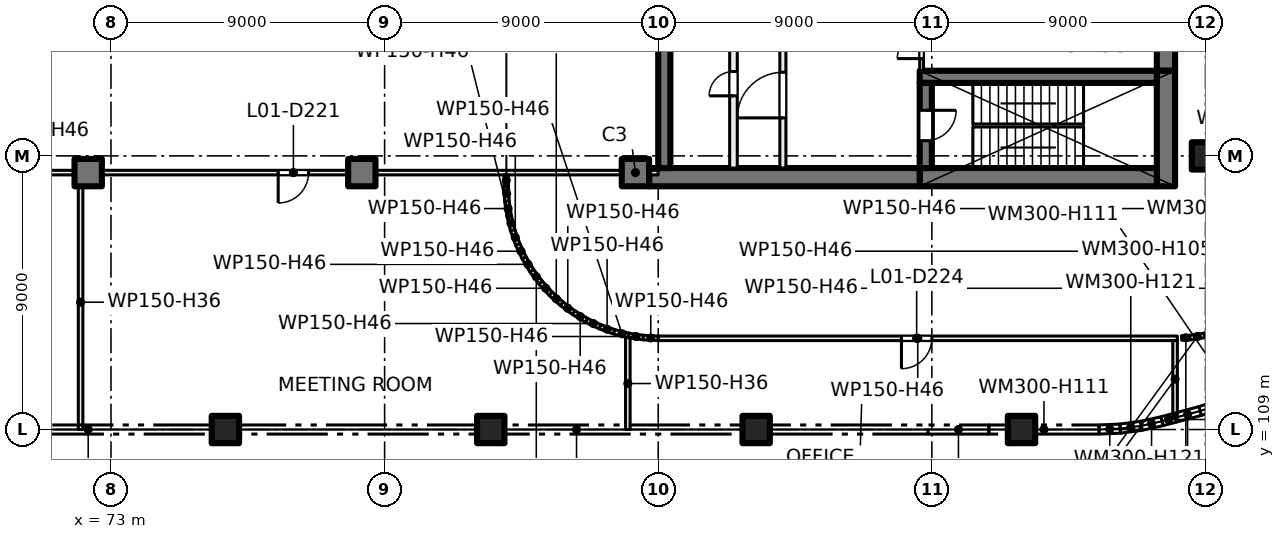
"""IFC4 building model, lengths in metres.
Left out: names, types, materials, properties, quantities, classifications, styles, units other than length and angle.
Written with IfcOpenShell. Run it as: python <this file> out.ifc"""

import sys

from ifc_helpers import new_model, si_unit, direction, frame, frame_2d, origin, origin_2d, place, context, subcontext, project, spatial, rectangle, extrude, element, fill, save


model = new_model("IFC4")
c1 = context("Model", 3, precision=1e-05, world=origin(), true_north=direction((0.0, 1.0)))
c2 = subcontext(c1, "Body", "Model", "MODEL_VIEW")
j1 = project(units=[si_unit("LENGTHUNIT", "METRE"), si_unit("PLANEANGLEUNIT", "RADIAN")], contexts=[c1])
p1 = place(None, origin())
s1 = spatial("IfcSite", under=j1, at=p1, CompositionType="ELEMENT")
p2 = place(p1, origin())
s2 = spatial("IfcBuilding", under=s1, at=p2, CompositionType="ELEMENT")
p3 = place(p2, frame((0.0, 0.0, 7.5)))
s3 = spatial("IfcBuildingStorey", under=s2, at=p3, CompositionType="ELEMENT", Elevation=7.5)
for number, where, z_axis, x_axis in (
    (1, (109.0, 118.0, 0.0), (0.0, 0.0, 1.0), (1.0, 0.0, 0.0)),
    (2, (76.762, 109.0, 0.0), (0.0, 0.0, 1.0), (1.0, 0.0, 0.0)),
    (3, (85.491, 109.0, 0.0), (0.0, 0.0, 1.0), (1.0, 0.0, 0.0)),
    (4, (94.221, 109.0, 0.0), (0.0, 0.0, 1.0), (1.0, 0.0, 0.0)),
    (5, (102.95, 109.0, 0.0), (0.0, 0.0, 1.0), (1.0, 0.0, 0.0)),
    (6, (72.25, 117.45, 0.0), (0.0, 0.0, 1.0), (1.0, 0.0, 0.0)),
    (7, (81.25, 117.45, 0.0), (0.0, 0.0, 1.0), (1.0, 0.0, 0.0)),
    (8, (90.25, 117.45, 0.0), (0.0, 0.0, 1.0), (1.0, 0.0, 0.0)),
):
    element("IfcColumn", number, at=place(p3, frame(where, z_axis=z_axis, x_axis=x_axis)), inside=s3, PredefinedType="COLUMN", context=c2, shape_type="SweptSolid", body=[
        extrude(rectangle(XDim=0.9, YDim=0.9, at=origin_2d()), origin(), (0.0, 0.0, 1.0), 5.0),
    ])
p4 = place(p3, frame((107.7, 135.2, 0.0), z_axis=(0.0, 0.0, 1.0), x_axis=(0.0, -1.0, 0.0)))
e9 = element("IfcWall", 9, at=p4, inside=s3, PredefinedType="SHEAR", context=c2, shape_type="SweptSolid", body=[
    extrude(rectangle(XDim=14.4, YDim=0.6, at=frame_2d((7.2, 0.0))), origin(), (0.0, 0.0, 1.0), 5.0),
])
p5 = place(p3, frame((107.7, 120.8, 0.0), z_axis=(0.0, 0.0, 1.0), x_axis=(0.0, -1.0, 0.0)))
e10 = element("IfcWall", 10, at=p5, inside=s3, PredefinedType="SHEAR", context=c2, shape_type="SweptSolid", body=[
    extrude(rectangle(XDim=3.8, YDim=0.6, at=frame_2d((1.9, 0.0))), origin(), (0.0, 0.0, 1.0), 5.0),
])
p6 = place(p3, frame((107.4, 117.3, 0.0), z_axis=(0.0, 0.0, 1.0), x_axis=(-1.0, 0.0, 0.0)))
e11 = element("IfcWall", 11, at=p6, inside=s3, PredefinedType="SHEAR", context=c2, shape_type="SweptSolid", body=[
    extrude(rectangle(XDim=7.8, YDim=0.6, at=frame_2d((3.9, 0.0))), origin(), (0.0, 0.0, 1.0), 5.0),
])
p7 = place(p3, frame((99.6, 117.3, 0.0), z_axis=(0.0, 0.0, 1.0), x_axis=(-1.0, 0.0, 0.0)))
e12 = element("IfcWall", 12, at=p7, inside=s3, PredefinedType="SHEAR", context=c2, shape_type="SweptSolid", body=[
    extrude(rectangle(XDim=8.9, YDim=0.6, at=frame_2d((4.45, 0.0))), origin(), (0.0, 0.0, 1.0), 5.0),
])
p8 = place(p3, frame((107.4, 120.6, 0.0), z_axis=(0.0, 0.0, 1.0), x_axis=(-1.0, 0.0, 0.0)))
e13 = element("IfcWall", 13, at=p8, inside=s3, PredefinedType="SHEAR", context=c2, shape_type="SweptSolid", body=[
    extrude(rectangle(XDim=7.8, YDim=0.4, at=frame_2d((3.9, 0.0))), origin(), (0.0, 0.0, 1.0), 5.0),
])
p9 = place(p3, frame((99.8, 120.4, 0.0), z_axis=(0.0, 0.0, 1.0), x_axis=(0.0, -1.0, 0.0)))
e14 = element("IfcWall", 14, at=p9, inside=s3, PredefinedType="SHEAR", context=c2, shape_type="SweptSolid", body=[
    extrude(rectangle(XDim=2.8, YDim=0.4, at=frame_2d((1.4, 0.0))), origin(), (0.0, 0.0, 1.0), 5.0),
])
p10 = place(p9, frame((0.9, 0.0, 0.0)))
e15 = element("IfcOpeningElement", 15, at=p10, cuts=e14, PredefinedType="OPENING", context=c2, shape_type="SweptSolid", body=[
    extrude(rectangle(XDim=1.0, YDim=2.1, at=frame_2d((0.5, 1.05))), frame((0.0, 0.21, 0.0), z_axis=(0.0, -1.0, 0.0), x_axis=(1.0, 0.0, 0.0)), (0.0, 0.0, 1.0), 0.42),
])
p11 = place(p3, frame((91.2, 126.2, 0.0), z_axis=(0.0, 0.0, 1.0), x_axis=(0.0, -1.0, 0.0)))
e16 = element("IfcWall", 16, at=p11, inside=s3, PredefinedType="SHEAR", context=c2, shape_type="SweptSolid", body=[
    extrude(rectangle(XDim=8.6, YDim=0.4, at=frame_2d((4.3, 0.0))), origin(), (0.0, 0.0, 1.0), 5.0),
])
p12 = place(p2, origin())
s4 = spatial("IfcBuildingStorey", under=s2, at=p12, CompositionType="ELEMENT", Elevation=0.0)
p13 = place(p12, frame((67.75, 109.0, 0.0), z_axis=(0.0, 0.0, 1.0), x_axis=(1.0, 0.0, 0.0)))
e17 = element("IfcWall", 17, at=p13, inside=s4, PredefinedType="PARTITIONING", context=c2, shape_type="SweptSolid", body=[
    extrude(rectangle(XDim=9.0, YDim=0.3, at=frame_2d((4.5, 0.0))), origin(), (0.0, 0.0, 1.0), 11.1),
])
p14 = place(p12, frame((76.75, 109.0, 0.0), z_axis=(0.0, 0.0, 1.0), x_axis=(1.0, 0.0, 0.0)))
e18 = element("IfcWall", 18, at=p14, inside=s4, PredefinedType="PARTITIONING", context=c2, shape_type="SweptSolid", body=[
    extrude(rectangle(XDim=23.125, YDim=0.3, at=frame_2d((11.562, 0.0))), origin(), (0.0, 0.0, 1.0), 11.1),
])
p15 = place(p14, frame((1.425, 0.0, 0.0)))
e19 = element("IfcOpeningElement", 19, at=p15, cuts=e18, PredefinedType="OPENING", context=c2, shape_type="SweptSolid", body=[
    extrude(rectangle(XDim=2.4, YDim=2.4, at=frame_2d((1.2, 1.2))), frame((0.0, 0.16, 0.0), z_axis=(0.0, -1.0, 0.0), x_axis=(1.0, 0.0, 0.0)), (0.0, 0.0, 1.0), 0.32),
])
p16 = place(p14, frame((18.186, 0.0, 0.0)))
e20 = element("IfcOpeningElement", 20, at=p16, cuts=e18, PredefinedType="OPENING", context=c2, shape_type="SweptSolid", body=[
    extrude(rectangle(XDim=1.0, YDim=2.1, at=frame_2d((0.5, 1.05))), frame((0.0, 0.16, 0.0), z_axis=(0.0, -1.0, 0.0), x_axis=(1.0, 0.0, 0.0)), (0.0, 0.0, 1.0), 0.32),
])
p17 = place(p12, frame((101.875, 109.0, 0.0), z_axis=(0.0, 0.0, 1.0), x_axis=(-1.0, 0.0, 0.0)))
e21 = element("IfcWall", 21, at=p17, inside=s4, PredefinedType="PARTITIONING", context=c2, shape_type="SweptSolid", body=[
    extrude(rectangle(XDim=2.0, YDim=0.3, at=frame_2d((1.0, 0.0))), origin(), (0.0, 0.0, 1.0), 11.1),
])
p18 = place(p17, frame((0.5, 0.0, 0.0)))
e22 = element("IfcOpeningElement", 22, at=p18, cuts=e21, PredefinedType="OPENING", context=c2, shape_type="SweptSolid", body=[
    extrude(rectangle(XDim=1.0, YDim=2.1, at=frame_2d((0.5, 1.05))), frame((0.0, 0.16, 0.0), z_axis=(0.0, -1.0, 0.0), x_axis=(1.0, 0.0, 0.0)), (0.0, 0.0, 1.0), 0.32),
])
p19 = place(p12, frame((105.5, 109.0, 0.0), z_axis=(0.0, 0.0, 1.0), x_axis=(-1.0, 0.0, 0.0)))
e23 = element("IfcWall", 23, at=p19, inside=s4, PredefinedType="PARTITIONING", context=c2, shape_type="SweptSolid", body=[
    extrude(rectangle(XDim=3.625, YDim=0.3, at=frame_2d((1.812, 0.0))), origin(), (0.0, 0.0, 1.0), 11.1),
])
p20 = place(p19, frame((1.013, 0.0, 0.0)))
e24 = element("IfcOpeningElement", 24, at=p20, cuts=e23, PredefinedType="OPENING", context=c2, shape_type="SweptSolid", body=[
    extrude(rectangle(XDim=1.0, YDim=2.1, at=frame_2d((0.5, 1.05))), frame((0.0, 0.16, 0.0), z_axis=(0.0, -1.0, 0.0), x_axis=(1.0, 0.0, 0.0)), (0.0, 0.0, 1.0), 0.32),
])
p21 = place(p12, frame((105.5, 109.0, 0.0), z_axis=(0.0, 0.0, 1.0), x_axis=(0.999091766033, 0.042610363114, 0.0)))
e25 = element("IfcWall", 25, at=p21, inside=s4, PredefinedType="PARTITIONING", context=c2, shape_type="SweptSolid", body=[
    extrude(rectangle(XDim=0.705, YDim=0.3, at=frame_2d((0.353, 0.0))), origin(), (0.0, 0.0, 1.0), 12.1),
])
p22 = place(p12, frame((106.19, 109.029, 0.0), z_axis=(0.0, 0.0, 1.0), x_axis=(0.991230898017, 0.132141238136, 0.0)))
e26 = element("IfcWall", 26, at=p22, inside=s4, PredefinedType="PARTITIONING", context=c2, shape_type="SweptSolid", body=[
    extrude(rectangle(XDim=0.711, YDim=0.3, at=frame_2d((0.356, 0.0))), origin(), (0.0, 0.0, 1.0), 12.1),
])
p23 = place(p12, frame((106.883, 109.121, 0.0), z_axis=(0.0, 0.0, 1.0), x_axis=(0.976495894977, 0.21553599953, 0.0)))
e27 = element("IfcWall", 27, at=p23, inside=s4, PredefinedType="PARTITIONING", context=c2, shape_type="SweptSolid", body=[
    extrude(rectangle(XDim=0.705, YDim=0.3, at=frame_2d((0.352, 0.0))), origin(), (0.0, 0.0, 1.0), 12.1),
])
p24 = place(p12, frame((107.571, 109.273, 0.0), z_axis=(0.0, 0.0, 1.0), x_axis=(0.965896509383, 0.25892843251, 0.0)))
e28 = element("IfcWall", 28, at=p24, inside=s4, PredefinedType="PARTITIONING", context=c2, shape_type="SweptSolid", body=[
    extrude(rectangle(XDim=0.444, YDim=0.3, at=frame_2d((0.222, 0.0))), origin(), (0.0, 0.0, 1.0), 12.1),
])
p25 = place(p12, frame((108.0, 109.388, 0.0), z_axis=(0.0, 0.0, 1.0), x_axis=(0.965954430336, 0.258712269741, 0.0)))
e29 = element("IfcWall", 29, at=p25, inside=s4, PredefinedType="PARTITIONING", context=c2, shape_type="SweptSolid", body=[
    extrude(rectangle(XDim=0.854, YDim=0.3, at=frame_2d((0.427, 0.0))), origin(), (0.0, 0.0, 1.0), 12.1),
])
p26 = place(p12, frame((108.817, 109.607, 0.0), z_axis=(0.0, 0.0, 1.0), x_axis=(0.951602885229, 0.307330357798, 0.0)))
e30 = element("IfcWall", 30, at=p26, inside=s4, PredefinedType="PARTITIONING", context=c2, shape_type="SweptSolid", body=[
    extrude(rectangle(XDim=0.849, YDim=0.3, at=frame_2d((0.425, 0.0))), origin(), (0.0, 0.0, 1.0), 12.1),
])
p27 = place(p3, frame((95.1, 117.6, 0.0), z_axis=(0.0, 0.0, 1.0), x_axis=(0.0, 1.0, 0.0)))
e31 = element("IfcWall", 31, at=p27, inside=s3, PredefinedType="PARTITIONING", context=c2, shape_type="SweptSolid", body=[
    extrude(rectangle(XDim=8.4, YDim=0.2, at=frame_2d((4.2, 0.0))), origin(), (0.0, 0.0, 1.0), 4.6),
])
p28 = place(p27, frame((1.65, 0.0, 0.0)))
e32 = element("IfcOpeningElement", 32, at=p28, cuts=e31, PredefinedType="OPENING", context=c2, shape_type="SweptSolid", body=[
    extrude(rectangle(XDim=1.5, YDim=2.1, at=frame_2d((0.75, 1.05))), frame((0.0, 0.11, 0.0), z_axis=(0.0, -1.0, 0.0), x_axis=(1.0, 0.0, 0.0)), (0.0, 0.0, 1.0), 0.22),
])
p29 = place(p3, frame((93.475, 117.6, 0.0), z_axis=(0.0, 0.0, 1.0), x_axis=(0.0, 1.0, 0.0)))
e33 = element("IfcWall", 33, at=p29, inside=s3, PredefinedType="PARTITIONING", context=c2, shape_type="SweptSolid", body=[
    extrude(rectangle(XDim=8.4, YDim=0.25, at=frame_2d((4.2, 0.0))), origin(), (0.0, 0.0, 1.0), 4.6),
])
p30 = place(p29, frame((6.625, 0.0, 0.0)))
e34 = element("IfcOpeningElement", 34, at=p30, cuts=e33, PredefinedType="OPENING", context=c2, shape_type="SweptSolid", body=[
    extrude(rectangle(XDim=0.8, YDim=2.1, at=frame_2d((0.4, 1.05))), frame((0.0, 0.135, 0.0), z_axis=(0.0, -1.0, 0.0), x_axis=(1.0, 0.0, 0.0)), (0.0, 0.0, 1.0), 0.27),
])
p31 = place(p29, frame((2.375, 0.0, 0.0)))
e35 = element("IfcOpeningElement", 35, at=p31, cuts=e33, PredefinedType="OPENING", context=c2, shape_type="SweptSolid", body=[
    extrude(rectangle(XDim=0.8, YDim=2.1, at=frame_2d((0.4, 1.05))), frame((0.0, 0.135, 0.0), z_axis=(0.0, -1.0, 0.0), x_axis=(1.0, 0.0, 0.0)), (0.0, 0.0, 1.0), 0.27),
])
p32 = place(p3, frame((99.663, 120.8, 0.0), z_axis=(0.0, 0.0, 1.0), x_axis=(0.0, 1.0, 0.0)))
e36 = element("IfcWall", 36, at=p32, inside=s3, PredefinedType="PARTITIONING", context=c2, shape_type="SweptSolid", body=[
    extrude(rectangle(XDim=1.6, YDim=0.125, at=frame_2d((0.8, 0.0))), origin(), (0.0, 0.0, 1.0), 4.6),
])
p33 = place(p32, frame((0.4, 0.0, 0.0)))
e37 = element("IfcOpeningElement", 37, at=p33, cuts=e36, PredefinedType="OPENING", context=c2, shape_type="SweptSolid", body=[
    extrude(rectangle(XDim=0.8, YDim=2.1, at=frame_2d((0.4, 1.05))), frame((0.0, 0.073, 0.0), z_axis=(0.0, -1.0, 0.0), x_axis=(1.0, 0.0, 0.0)), (0.0, 0.0, 1.0), 0.145),
])
p34 = place(p3, frame((91.0, 117.45, 0.0), z_axis=(0.0, 0.0, 1.0), x_axis=(-1.0, 0.0, 0.0)))
e38 = element("IfcWall", 38, at=p34, inside=s3, PredefinedType="PARTITIONING", context=c2, shape_type="SweptSolid", body=[
    extrude(rectangle(XDim=41.175, YDim=0.15, at=frame_2d((20.587, 0.0))), origin(), (0.0, 0.0, 1.0), 4.6),
])
p35 = place(p34, frame((11.5, 0.0, 0.0)))
e39 = element("IfcOpeningElement", 39, at=p35, cuts=e38, PredefinedType="OPENING", context=c2, shape_type="SweptSolid", body=[
    extrude(rectangle(XDim=1.0, YDim=2.1, at=frame_2d((0.5, 1.05))), frame((0.0, 0.085, 0.0), z_axis=(0.0, -1.0, 0.0), x_axis=(1.0, 0.0, 0.0)), (0.0, 0.0, 1.0), 0.17),
])
p36 = place(p3, frame((72.0, 109.0, 0.0), z_axis=(0.0, 0.0, 1.0), x_axis=(0.0, 1.0, 0.0)))
e40 = element("IfcWall", 40, at=p36, inside=s3, PredefinedType="PARTITIONING", context=c2, shape_type="SweptSolid", body=[
    extrude(rectangle(XDim=8.375, YDim=0.15, at=frame_2d((4.188, 0.0))), origin(), (0.0, 0.0, 1.0), 3.6),
])
p37 = place(p3, frame((86.0, 116.998, 0.0), z_axis=(0.0, 0.0, 1.0), x_axis=(0.0, 1.0, 0.0)))
e41 = element("IfcWall", 41, at=p37, inside=s3, PredefinedType="PARTITIONING", context=c2, shape_type="SweptSolid", body=[
    extrude(rectangle(XDim=0.377, YDim=0.15, at=frame_2d((0.188, 0.0))), origin(), (0.0, 0.0, 1.0), 4.6),
])
p38 = place(p3, frame((86.0, 117.002, 0.0), z_axis=(0.0, 0.0, 1.0), x_axis=(0.048196018647, -0.998837896651, 0.0)))
e42 = element("IfcWall", 42, at=p38, inside=s3, PredefinedType="PARTITIONING", context=c2, shape_type="SweptSolid", body=[
    extrude(rectangle(XDim=0.496, YDim=0.15, at=frame_2d((0.248, 0.0))), origin(), (0.0, 0.0, 1.0), 4.6),
])
p39 = place(p3, frame((86.023, 116.514, 0.0), z_axis=(0.0, 0.0, 1.0), x_axis=(0.148412307247, -0.988925572052, 0.0)))
e43 = element("IfcWall", 43, at=p39, inside=s3, PredefinedType="PARTITIONING", context=c2, shape_type="SweptSolid", body=[
    extrude(rectangle(XDim=0.499, YDim=0.15, at=frame_2d((0.249, 0.0))), origin(), (0.0, 0.0, 1.0), 4.6),
])
p40 = place(p3, frame((86.095, 116.029, 0.0), z_axis=(0.0, 0.0, 1.0), x_axis=(0.242650732785, -0.970113715952, 0.0)))
e44 = element("IfcWall", 44, at=p40, inside=s3, PredefinedType="PARTITIONING", context=c2, shape_type="SweptSolid", body=[
    extrude(rectangle(XDim=0.499, YDim=0.15, at=frame_2d((0.25, 0.0))), origin(), (0.0, 0.0, 1.0), 4.6),
])
for number, where, z_axis, x_axis in (
    (45, (86.214, 115.553, 0.0), (0.0, 0.0, 1.0), (0.337, -0.941, 0.0)),
    (46, (86.379, 115.09, 0.0), (0.0, 0.0, 1.0), (0.428, -0.904, 0.0)),
):
    element("IfcWall", number, at=place(p3, frame(where, z_axis=z_axis, x_axis=x_axis)), inside=s3, PredefinedType="PARTITIONING", context=c2, shape_type="SweptSolid", body=[
        extrude(rectangle(XDim=0.498, YDim=0.15, at=frame_2d((0.249, 0.0))), origin(), (0.0, 0.0, 1.0), 4.6),
    ])
p41 = place(p3, frame((86.588, 114.646, 0.0), z_axis=(0.0, 0.0, 1.0), x_axis=(0.515791778052, -0.85671397893, 0.0)))
e47 = element("IfcWall", 47, at=p41, inside=s3, PredefinedType="PARTITIONING", context=c2, shape_type="SweptSolid", body=[
    extrude(rectangle(XDim=0.499, YDim=0.15, at=frame_2d((0.249, 0.0))), origin(), (0.0, 0.0, 1.0), 4.6),
])
p42 = place(p3, frame((86.841, 114.225, 0.0), z_axis=(0.0, 0.0, 1.0), x_axis=(0.594570362092, -0.80404358372, 0.0)))
e48 = element("IfcWall", 48, at=p42, inside=s3, PredefinedType="PARTITIONING", context=c2, shape_type="SweptSolid", body=[
    extrude(rectangle(XDim=0.498, YDim=0.15, at=frame_2d((0.249, 0.0))), origin(), (0.0, 0.0, 1.0), 4.6),
])
for number, where, z_axis, x_axis in (
    (49, (87.133, 113.831, 0.0), (0.0, 0.0, 1.0), (0.67, -0.742, 0.0)),
    (50, (87.461, 113.467, 0.0), (0.0, 0.0, 1.0), (0.742, -0.67, 0.0)),
):
    element("IfcWall", number, at=place(p3, frame(where, z_axis=z_axis, x_axis=x_axis)), inside=s3, PredefinedType="PARTITIONING", context=c2, shape_type="SweptSolid", body=[
        extrude(rectangle(XDim=0.499, YDim=0.15, at=frame_2d((0.249, 0.0))), origin(), (0.0, 0.0, 1.0), 4.6),
    ])
p43 = place(p3, frame((87.825, 113.137, 0.0), z_axis=(0.0, 0.0, 1.0), x_axis=(0.80404358372, -0.594570362092, 0.0)))
e51 = element("IfcWall", 51, at=p43, inside=s3, PredefinedType="PARTITIONING", context=c2, shape_type="SweptSolid", body=[
    extrude(rectangle(XDim=0.498, YDim=0.15, at=frame_2d((0.249, 0.0))), origin(), (0.0, 0.0, 1.0), 4.6),
])
p44 = place(p3, frame((88.219, 112.845, 0.0), z_axis=(0.0, 0.0, 1.0), x_axis=(0.85671397893, -0.515791778052, 0.0)))
e52 = element("IfcWall", 52, at=p44, inside=s3, PredefinedType="PARTITIONING", context=c2, shape_type="SweptSolid", body=[
    extrude(rectangle(XDim=0.499, YDim=0.15, at=frame_2d((0.249, 0.0))), origin(), (0.0, 0.0, 1.0), 4.6),
])
for number, where, z_axis, x_axis in (
    (53, (88.64, 112.592, 0.0), (0.0, 0.0, 1.0), (0.904, -0.428, 0.0)),
    (54, (89.084, 112.382, 0.0), (0.0, 0.0, 1.0), (0.941, -0.337, 0.0)),
):
    element("IfcWall", number, at=place(p3, frame(where, z_axis=z_axis, x_axis=x_axis)), inside=s3, PredefinedType="PARTITIONING", context=c2, shape_type="SweptSolid", body=[
        extrude(rectangle(XDim=0.498, YDim=0.15, at=frame_2d((0.249, 0.0))), origin(), (0.0, 0.0, 1.0), 4.6),
    ])
p45 = place(p3, frame((89.545, 112.216, 0.0), z_axis=(0.0, 0.0, 1.0), x_axis=(0.970116111764, -0.242641154168, 0.0)))
e55 = element("IfcWall", 55, at=p45, inside=s3, PredefinedType="PARTITIONING", context=c2, shape_type="SweptSolid", body=[
    extrude(rectangle(XDim=0.544, YDim=0.15, at=frame_2d((0.272, 0.0))), origin(), (0.0, 0.0, 1.0), 4.6),
])
p46 = place(p3, frame((90.0, 109.0, 0.0), z_axis=(0.0, 0.0, 1.0), x_axis=(0.0, 1.0, 0.0)))
e56 = element("IfcWall", 56, at=p46, inside=s3, PredefinedType="PARTITIONING", context=c2, shape_type="SweptSolid", body=[
    extrude(rectangle(XDim=3.025, YDim=0.15, at=frame_2d((1.512, 0.0))), origin(), (0.0, 0.0, 1.0), 3.6),
])
p47 = place(p3, frame((90.025, 112.096, 0.0), z_axis=(0.0, 0.0, 1.0), x_axis=(0.989041138834, -0.147640189971, 0.0)))
e57 = element("IfcWall", 57, at=p47, inside=s3, PredefinedType="PARTITIONING", context=c2, shape_type="SweptSolid", body=[
    extrude(rectangle(XDim=0.494, YDim=0.15, at=frame_2d((0.247, 0.0))), origin(), (0.0, 0.0, 1.0), 4.6),
])
p48 = place(p3, frame((90.506, 112.024, 0.0), z_axis=(0.0, 0.0, 1.0), x_axis=(0.998837896651, -0.048196018647, 0.0)))
e58 = element("IfcWall", 58, at=p48, inside=s3, PredefinedType="PARTITIONING", context=c2, shape_type="SweptSolid", body=[
    extrude(rectangle(XDim=0.496, YDim=0.15, at=frame_2d((0.248, 0.0))), origin(), (0.0, 0.0, 1.0), 4.6),
])
p49 = place(p3, frame((108.075, 112.0, 0.0), z_axis=(0.0, 0.0, 1.0), x_axis=(-1.0, 0.0, 0.0)))
e59 = element("IfcWall", 59, at=p49, inside=s3, PredefinedType="PARTITIONING", context=c2, shape_type="SweptSolid", body=[
    extrude(rectangle(XDim=17.077, YDim=0.15, at=frame_2d((8.539, 0.0))), origin(), (0.0, 0.0, 1.0), 4.6),
])
p50 = place(p49, frame((8.075, 0.0, 0.0)))
e60 = element("IfcOpeningElement", 60, at=p50, cuts=e59, PredefinedType="OPENING", context=c2, shape_type="SweptSolid", body=[
    extrude(rectangle(XDim=1.0, YDim=2.1, at=frame_2d((0.5, 1.05))), frame((0.0, 0.085, 0.0), z_axis=(0.0, -1.0, 0.0), x_axis=(1.0, 0.0, 0.0)), (0.0, 0.0, 1.0), 0.17),
])
p51 = place(p3, frame((108.0, 109.388, 0.0), z_axis=(0.0, 0.0, 1.0), x_axis=(0.0, 1.0, 0.0)))
e61 = element("IfcWall", 61, at=p51, inside=s3, PredefinedType="PARTITIONING", context=c2, shape_type="SweptSolid", body=[
    extrude(rectangle(XDim=2.537, YDim=0.15, at=frame_2d((1.269, 0.0))), origin(), (0.0, 0.0, 1.0), 3.6),
])
p52 = place(p3, frame((108.214, 112.01, 0.0), z_axis=(0.0, 0.0, 1.0), x_axis=(0.99876534507, 0.049676810357, 0.0)))
e62 = element("IfcWall", 62, at=p52, inside=s3, PredefinedType="PARTITIONING", context=c2, shape_type="SweptSolid", body=[
    extrude(rectangle(XDim=0.28, YDim=0.15, at=frame_2d((0.14, 0.0))), origin(), (0.0, 0.0, 1.0), 4.6),
])
p53 = place(p3, frame((108.486, 112.023, 0.0), z_axis=(0.0, 0.0, 1.0), x_axis=(0.988925572052, 0.148412307247, 0.0)))
e63 = element("IfcWall", 63, at=p53, inside=s3, PredefinedType="PARTITIONING", context=c2, shape_type="SweptSolid", body=[
    extrude(rectangle(XDim=0.499, YDim=0.15, at=frame_2d((0.249, 0.0))), origin(), (0.0, 0.0, 1.0), 4.6),
])
p54 = place(p3, frame((108.971, 112.095, 0.0), z_axis=(0.0, 0.0, 1.0), x_axis=(0.970113715952, 0.242650732785, 0.0)))
e64 = element("IfcWall", 64, at=p54, inside=s3, PredefinedType="PARTITIONING", context=c2, shape_type="SweptSolid", body=[
    extrude(rectangle(XDim=0.499, YDim=0.15, at=frame_2d((0.25, 0.0))), origin(), (0.0, 0.0, 1.0), 4.6),
])
p55 = place(p28, origin())
e65 = element("IfcDoor", 65, at=p55, inside=s3, OperationType="DOUBLE_DOOR_SINGLE_SWING", PredefinedType="DOOR", context=c2, shape_type="SweptSolid", body=[
    extrude(rectangle(XDim=1.5, YDim=2.1, at=frame_2d((0.75, 1.05))), frame((0.0, 0.025, 0.0), z_axis=(0.0, -1.0, 0.0), x_axis=(1.0, 0.0, 0.0)), (0.0, 0.0, 1.0), 0.05),
])
fill(e32, e65)
p56 = place(p10, origin())
e66 = element("IfcDoor", 66, at=p56, inside=s3, OperationType="SINGLE_SWING_LEFT", PredefinedType="DOOR", context=c2, shape_type="SweptSolid", body=[
    extrude(rectangle(XDim=1.0, YDim=2.1, at=frame_2d((0.5, 1.05))), frame((0.0, 0.025, 0.0), z_axis=(0.0, -1.0, 0.0), x_axis=(1.0, 0.0, 0.0)), (0.0, 0.0, 1.0), 0.05),
])
fill(e15, e66)
p57 = place(p33, origin())
e67 = element("IfcDoor", 67, at=p57, inside=s3, OperationType="SINGLE_SWING_RIGHT", PredefinedType="DOOR", context=c2, shape_type="SweptSolid", body=[
    extrude(rectangle(XDim=0.8, YDim=2.1, at=frame_2d((0.4, 1.05))), frame((0.0, 0.025, 0.0), z_axis=(0.0, -1.0, 0.0), x_axis=(1.0, 0.0, 0.0)), (0.0, 0.0, 1.0), 0.05),
])
fill(e37, e67)
p58 = place(p31, origin())
e68 = element("IfcDoor", 68, at=p58, inside=s3, OperationType="SINGLE_SWING_RIGHT", PredefinedType="DOOR", context=c2, shape_type="SweptSolid", body=[
    extrude(rectangle(XDim=0.8, YDim=2.1, at=frame_2d((0.4, 1.05))), frame((0.0, 0.025, 0.0), z_axis=(0.0, -1.0, 0.0), x_axis=(1.0, 0.0, 0.0)), (0.0, 0.0, 1.0), 0.05),
])
fill(e35, e68)
p59 = place(p35, origin())
e69 = element("IfcDoor", 69, at=p59, inside=s3, OperationType="SINGLE_SWING_RIGHT", PredefinedType="DOOR", context=c2, shape_type="SweptSolid", body=[
    extrude(rectangle(XDim=1.0, YDim=2.1, at=frame_2d((0.5, 1.05))), frame((0.0, 0.025, 0.0), z_axis=(0.0, -1.0, 0.0), x_axis=(1.0, 0.0, 0.0)), (0.0, 0.0, 1.0), 0.05),
])
fill(e39, e69)
p60 = place(p50, origin())
e70 = element("IfcDoor", 70, at=p60, inside=s3, OperationType="SINGLE_SWING_RIGHT", PredefinedType="DOOR", context=c2, shape_type="SweptSolid", body=[
    extrude(rectangle(XDim=1.0, YDim=2.1, at=frame_2d((0.5, 1.05))), frame((0.0, 0.025, 0.0), z_axis=(0.0, -1.0, 0.0), x_axis=(1.0, 0.0, 0.0)), (0.0, 0.0, 1.0), 0.05),
])
fill(e60, e70)
save(model, sys.argv[1])
